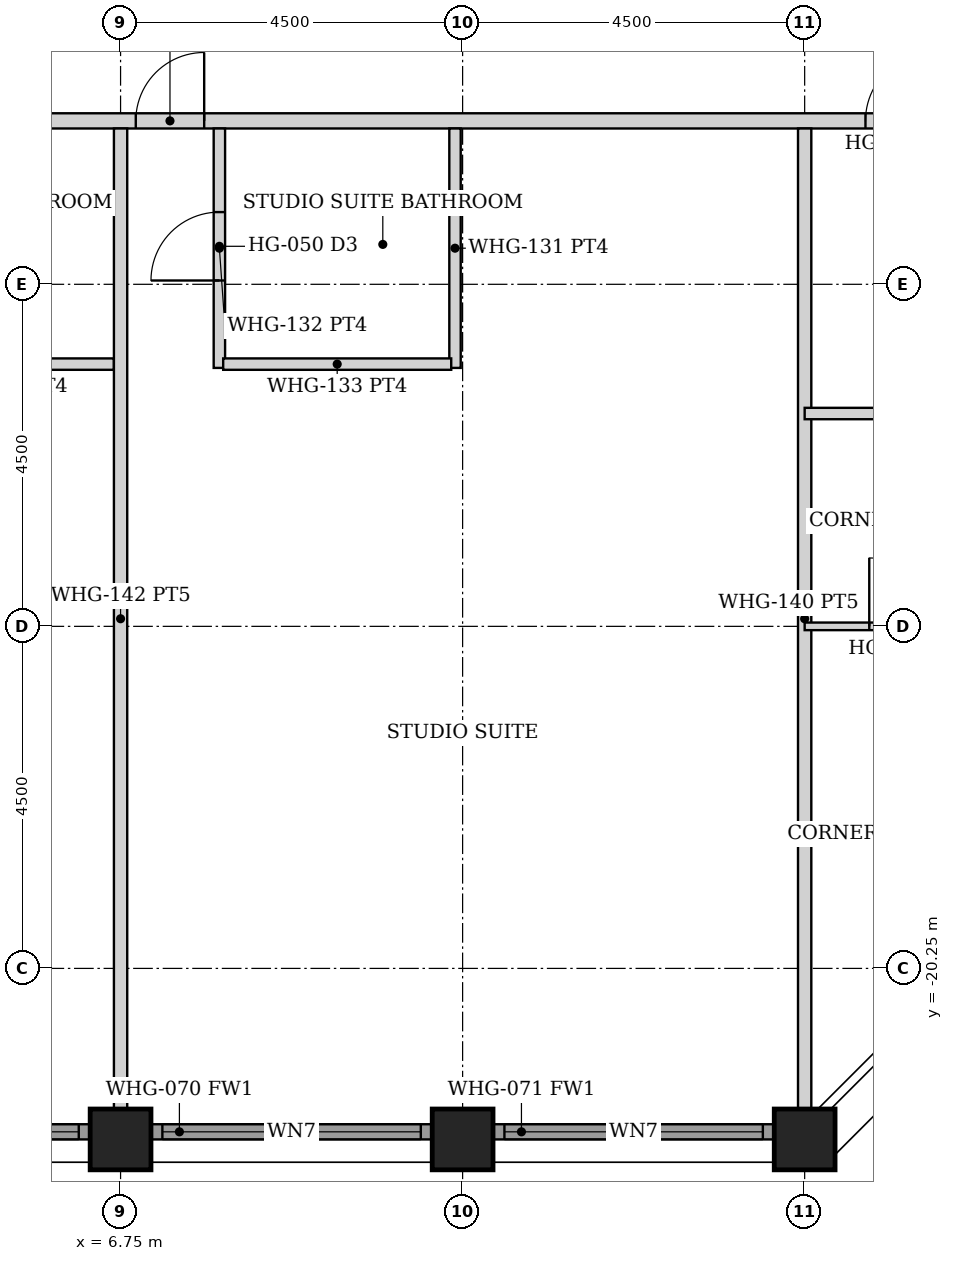
"""IFC4 building model, lengths in metres.
Left out: names, types, materials, properties, quantities, classifications, styles, units other than length and angle.
Written with IfcOpenShell. Run it as: python <this file> out.ifc"""

import sys

from ifc_helpers import new_model, si_unit, direction, frame, frame_2d, origin, origin_2d, place, context, subcontext, project, spatial, rectangle, hollow_rectangle, extrude, element, fill, save


model = new_model("IFC4")
c1 = context("Model", 3, precision=1e-05, world=origin(), true_north=direction((0.0, 1.0)))
c2 = subcontext(c1, "Body", "Model", "MODEL_VIEW")
j1 = project(units=[si_unit("LENGTHUNIT", "METRE"), si_unit("PLANEANGLEUNIT", "RADIAN")], contexts=[c1])
p1 = place(None, origin())
s1 = spatial("IfcSite", under=j1, at=p1, CompositionType="ELEMENT")
p2 = place(p1, origin())
s2 = spatial("IfcBuilding", under=s1, at=p2, CompositionType="ELEMENT")
p3 = place(p2, frame((0.0, 0.0, 186.8)))
s3 = spatial("IfcBuildingStorey", under=s2, at=p3, CompositionType="ELEMENT", Elevation=186.8)
for number, where, z_axis, x_axis in (
    (1, (6.75, -22.5, 0.0), (0.0, 0.0, 1.0), (0.0, 1.0, 0.0)),
    (2, (11.25, -22.5, 0.0), (0.0, 0.0, 1.0), (0.0, 1.0, 0.0)),
    (3, (15.75, -22.5, 0.0), (0.0, 0.0, 1.0), (0.0, 1.0, 0.0)),
):
    element("IfcColumn", number, at=place(p3, frame(where, z_axis=z_axis, x_axis=x_axis)), inside=s3, PredefinedType="COLUMN", context=c2, shape_type="SweptSolid", body=[
        extrude(hollow_rectangle(XDim=0.8, YDim=0.8, WallThickness=0.045, at=origin_2d()), origin(), (0.0, 0.0, 1.0), 3.6),
    ])
p4 = place(p3, frame((2.655, -22.4, 0.0), z_axis=(0.0, 0.0, 1.0), x_axis=(1.0, 0.0, 0.0)))
e4 = element("IfcWall", 4, at=p4, inside=s3, PredefinedType="SOLIDWALL", context=c2, shape_type="SweptSolid", body=[
    extrude(rectangle(XDim=3.69, YDim=0.2, at=frame_2d((1.845, 0.0))), origin(), (0.0, 0.0, 1.0), 2.379),
])
p5 = place(p4, frame((0.145, 0.0, 0.3)))
e5 = element("IfcOpeningElement", 5, at=p5, cuts=e4, PredefinedType="OPENING", context=c2, shape_type="SweptSolid", body=[
    extrude(rectangle(XDim=3.4, YDim=1.929, at=frame_2d((1.7, 0.964))), frame((0.0, 0.11, 0.0), z_axis=(0.0, -1.0, 0.0), x_axis=(1.0, 0.0, 0.0)), (0.0, 0.0, 1.0), 0.22),
])
p6 = place(p3, frame((7.155, -22.4, 0.0), z_axis=(0.0, 0.0, 1.0), x_axis=(1.0, 0.0, 0.0)))
e6 = element("IfcWall", 6, at=p6, inside=s3, PredefinedType="SOLIDWALL", context=c2, shape_type="SweptSolid", body=[
    extrude(rectangle(XDim=3.69, YDim=0.2, at=frame_2d((1.845, 0.0))), origin(), (0.0, 0.0, 1.0), 2.379),
])
p7 = place(p6, frame((0.145, 0.0, 0.3)))
e7 = element("IfcOpeningElement", 7, at=p7, cuts=e6, PredefinedType="OPENING", context=c2, shape_type="SweptSolid", body=[
    extrude(rectangle(XDim=3.4, YDim=1.929, at=frame_2d((1.7, 0.964))), frame((0.0, 0.11, 0.0), z_axis=(0.0, -1.0, 0.0), x_axis=(1.0, 0.0, 0.0)), (0.0, 0.0, 1.0), 0.22),
])
p8 = place(p3, frame((11.655, -22.4, 0.0), z_axis=(0.0, 0.0, 1.0), x_axis=(1.0, 0.0, 0.0)))
e8 = element("IfcWall", 8, at=p8, inside=s3, PredefinedType="SOLIDWALL", context=c2, shape_type="SweptSolid", body=[
    extrude(rectangle(XDim=3.69, YDim=0.2, at=frame_2d((1.845, 0.0))), origin(), (0.0, 0.0, 1.0), 2.379),
])
p9 = place(p8, frame((0.145, 0.0, 0.3)))
e9 = element("IfcOpeningElement", 9, at=p9, cuts=e8, PredefinedType="OPENING", context=c2, shape_type="SweptSolid", body=[
    extrude(rectangle(XDim=3.4, YDim=1.929, at=frame_2d((1.7, 0.964))), frame((0.0, 0.11, 0.0), z_axis=(0.0, -1.0, 0.0), x_axis=(1.0, 0.0, 0.0)), (0.0, 0.0, 1.0), 0.22),
])
p10 = place(p3, frame((-22.3, -9.1, 0.0), z_axis=(0.0, 0.0, 1.0), x_axis=(1.0, 0.0, 0.0)))
e10 = element("IfcWall", 10, at=p10, inside=s3, PredefinedType="PARTITIONING", context=c2, shape_type="SweptSolid", body=[
    extrude(rectangle(XDim=44.6, YDim=0.2, at=frame_2d((22.3, 0.0))), origin(), (0.0, 0.0, 1.0), 2.379),
])
p11 = place(p10, frame((11.35, 0.0, 0.0)))
e11 = element("IfcOpeningElement", 11, at=p11, cuts=e10, PredefinedType="OPENING", context=c2, shape_type="SweptSolid", body=[
    extrude(rectangle(XDim=0.9, YDim=2.1, at=frame_2d((0.45, 1.05))), frame((0.0, 0.11, 0.0), z_axis=(0.0, -1.0, 0.0), x_axis=(1.0, 0.0, 0.0)), (0.0, 0.0, 1.0), 0.22),
])
p12 = place(p10, frame((15.75, 0.0, 0.0)))
e12 = element("IfcOpeningElement", 12, at=p12, cuts=e10, PredefinedType="OPENING", context=c2, shape_type="SweptSolid", body=[
    extrude(rectangle(XDim=0.9, YDim=2.1, at=frame_2d((0.45, 1.05))), frame((0.0, 0.11, 0.0), z_axis=(0.0, -1.0, 0.0), x_axis=(1.0, 0.0, 0.0)), (0.0, 0.0, 1.0), 0.22),
])
p13 = place(p10, frame((23.45, 0.0, 0.0)))
e13 = element("IfcOpeningElement", 13, at=p13, cuts=e10, PredefinedType="OPENING", context=c2, shape_type="SweptSolid", body=[
    extrude(rectangle(XDim=0.9, YDim=2.1, at=frame_2d((0.45, 1.05))), frame((0.0, 0.11, 0.0), z_axis=(0.0, -1.0, 0.0), x_axis=(1.0, 0.0, 0.0)), (0.0, 0.0, 1.0), 0.22),
])
p14 = place(p10, frame((24.75, 0.0, 0.0)))
e14 = element("IfcOpeningElement", 14, at=p14, cuts=e10, PredefinedType="OPENING", context=c2, shape_type="SweptSolid", body=[
    extrude(rectangle(XDim=0.9, YDim=2.1, at=frame_2d((0.45, 1.05))), frame((0.0, 0.11, 0.0), z_axis=(0.0, -1.0, 0.0), x_axis=(1.0, 0.0, 0.0)), (0.0, 0.0, 1.0), 0.22),
])
p15 = place(p10, frame((29.25, 0.0, 0.0)))
e15 = element("IfcOpeningElement", 15, at=p15, cuts=e10, PredefinedType="OPENING", context=c2, shape_type="SweptSolid", body=[
    extrude(rectangle(XDim=0.9, YDim=2.1, at=frame_2d((0.45, 1.05))), frame((0.0, 0.11, 0.0), z_axis=(0.0, -1.0, 0.0), x_axis=(1.0, 0.0, 0.0)), (0.0, 0.0, 1.0), 0.22),
])
p16 = place(p10, frame((38.85, 0.0, 0.0)))
e16 = element("IfcOpeningElement", 16, at=p16, cuts=e10, PredefinedType="OPENING", context=c2, shape_type="SweptSolid", body=[
    extrude(rectangle(XDim=0.9, YDim=2.1, at=frame_2d((0.45, 1.05))), frame((0.0, 0.11, 0.0), z_axis=(0.0, -1.0, 0.0), x_axis=(1.0, 0.0, 0.0)), (0.0, 0.0, 1.0), 0.22),
])
p17 = place(p10, frame((4.85, 0.0, 0.0)))
e17 = element("IfcOpeningElement", 17, at=p17, cuts=e10, PredefinedType="OPENING", context=c2, shape_type="SweptSolid", body=[
    extrude(rectangle(XDim=0.9, YDim=2.1, at=frame_2d((0.45, 1.05))), frame((0.0, 0.11, 0.0), z_axis=(0.0, -1.0, 0.0), x_axis=(1.0, 0.0, 0.0)), (0.0, 0.0, 1.0), 0.22),
])
p18 = place(p3, frame((3.6, -12.3, 0.0), z_axis=(0.0, 0.0, 1.0), x_axis=(1.0, 0.0, 0.0)))
e18 = element("IfcWall", 18, at=p18, inside=s3, PredefinedType="PARTITIONING", context=c2, shape_type="SweptSolid", body=[
    extrude(rectangle(XDim=3.062, YDim=0.15, at=frame_2d((1.531, 0.0))), origin(), (0.0, 0.0, 1.0), 2.379),
])
p19 = place(p3, frame((8.05, -12.35, 0.0), z_axis=(0.0, 0.0, 1.0), x_axis=(0.0, 1.0, 0.0)))
e19 = element("IfcWall", 19, at=p19, inside=s3, PredefinedType="PARTITIONING", context=c2, shape_type="SweptSolid", body=[
    extrude(rectangle(XDim=3.15, YDim=0.15, at=frame_2d((1.575, 0.0))), origin(), (0.0, 0.0, 1.0), 2.379),
])
p20 = place(p19, frame((1.15, 0.0, 0.0)))
e20 = element("IfcOpeningElement", 20, at=p20, cuts=e19, PredefinedType="OPENING", context=c2, shape_type="SweptSolid", body=[
    extrude(rectangle(XDim=0.9, YDim=2.1, at=frame_2d((0.45, 1.05))), frame((0.0, 0.085, 0.0), z_axis=(0.0, -1.0, 0.0), x_axis=(1.0, 0.0, 0.0)), (0.0, 0.0, 1.0), 0.17),
])
p21 = place(p3, frame((11.15, -12.35, 0.0), z_axis=(0.0, 0.0, 1.0), x_axis=(0.0, 1.0, 0.0)))
e21 = element("IfcWall", 21, at=p21, inside=s3, PredefinedType="PARTITIONING", context=c2, shape_type="SweptSolid", body=[
    extrude(rectangle(XDim=3.15, YDim=0.15, at=frame_2d((1.575, 0.0))), origin(), (0.0, 0.0, 1.0), 2.379),
])
p22 = place(p3, frame((8.1, -12.3, 0.0), z_axis=(0.0, 0.0, 1.0), x_axis=(1.0, 0.0, 0.0)))
e22 = element("IfcWall", 22, at=p22, inside=s3, PredefinedType="PARTITIONING", context=c2, shape_type="SweptSolid", body=[
    extrude(rectangle(XDim=3.0, YDim=0.15, at=frame_2d((1.5, 0.0))), origin(), (0.0, 0.0, 1.0), 2.379),
])
for number, where, z_axis, x_axis in (
    (23, (6.75, -22.1, 0.0), (0.0, 0.0, 1.0), (0.0, 1.0, 0.0)),
    (24, (15.75, -22.1, 0.0), (0.0, 0.0, 1.0), (0.0, 1.0, 0.0)),
):
    element("IfcWall", number, at=place(p3, frame(where, z_axis=z_axis, x_axis=x_axis)), inside=s3, PredefinedType="PARTITIONING", context=c2, shape_type="SweptSolid", body=[
        extrude(rectangle(XDim=12.9, YDim=0.175, at=frame_2d((6.45, 0.0))), origin(), (0.0, 0.0, 1.0), 2.379),
    ])
p23 = place(p3, frame((15.75, -15.75, 0.0), z_axis=(0.0, 0.0, 1.0), x_axis=(1.0, 0.0, 0.0)))
e25 = element("IfcWall", 25, at=p23, inside=s3, PredefinedType="PARTITIONING", context=c2, shape_type="SweptSolid", body=[
    extrude(rectangle(XDim=6.35, YDim=0.1, at=frame_2d((3.175, 0.0))), origin(), (0.0, 0.0, 1.0), 2.379),
])
p24 = place(p23, frame((4.125, 0.0, 0.0)))
e26 = element("IfcOpeningElement", 26, at=p24, cuts=e25, PredefinedType="OPENING", context=c2, shape_type="SweptSolid", body=[
    extrude(rectangle(XDim=0.85, YDim=2.1, at=frame_2d((0.425, 1.05))), frame((0.0, 0.06, 0.0), z_axis=(0.0, -1.0, 0.0), x_axis=(1.0, 0.0, 0.0)), (0.0, 0.0, 1.0), 0.12),
])
p25 = place(p23, frame((0.85, 0.0, 0.0)))
e27 = element("IfcOpeningElement", 27, at=p25, cuts=e25, PredefinedType="OPENING", context=c2, shape_type="SweptSolid", body=[
    extrude(rectangle(XDim=0.9, YDim=2.1, at=frame_2d((0.45, 1.05))), frame((0.0, 0.06, 0.0), z_axis=(0.0, -1.0, 0.0), x_axis=(1.0, 0.0, 0.0)), (0.0, 0.0, 1.0), 0.12),
])
p26 = place(p3, frame((15.75, -12.95, 0.0), z_axis=(0.0, 0.0, 1.0), x_axis=(1.0, 0.0, 0.0)))
e28 = element("IfcWall", 28, at=p26, inside=s3, PredefinedType="PARTITIONING", context=c2, shape_type="SweptSolid", body=[
    extrude(rectangle(XDim=2.8, YDim=0.15, at=frame_2d((1.4, 0.0))), origin(), (0.0, 0.0, 1.0), 2.379),
])
p27 = place(p5, origin())
e29 = element("IfcWindow", 29, at=p27, inside=s3, PartitioningType="SINGLE_PANEL", PredefinedType="WINDOW", context=c2, shape_type="SweptSolid", body=[
    extrude(rectangle(XDim=3.4, YDim=1.929, at=frame_2d((1.7, 0.964))), frame((0.0, 0.03, 0.0), z_axis=(0.0, -1.0, 0.0), x_axis=(1.0, 0.0, 0.0)), (0.0, 0.0, 1.0), 0.06),
])
fill(e5, e29)
p28 = place(p7, origin())
e30 = element("IfcWindow", 30, at=p28, inside=s3, PartitioningType="SINGLE_PANEL", PredefinedType="WINDOW", context=c2, shape_type="SweptSolid", body=[
    extrude(rectangle(XDim=3.4, YDim=1.929, at=frame_2d((1.7, 0.964))), frame((0.0, 0.03, 0.0), z_axis=(0.0, -1.0, 0.0), x_axis=(1.0, 0.0, 0.0)), (0.0, 0.0, 1.0), 0.06),
])
fill(e7, e30)
p29 = place(p9, origin())
e31 = element("IfcWindow", 31, at=p29, inside=s3, PartitioningType="SINGLE_PANEL", PredefinedType="WINDOW", context=c2, shape_type="SweptSolid", body=[
    extrude(rectangle(XDim=3.4, YDim=1.929, at=frame_2d((1.7, 0.964))), frame((0.0, 0.03, 0.0), z_axis=(0.0, -1.0, 0.0), x_axis=(1.0, 0.0, 0.0)), (0.0, 0.0, 1.0), 0.06),
])
fill(e9, e31)
p30 = place(p15, origin())
e32 = element("IfcDoor", 32, at=p30, inside=s3, OperationType="SINGLE_SWING_RIGHT", PredefinedType="DOOR", context=c2, shape_type="SweptSolid", body=[
    extrude(rectangle(XDim=0.9, YDim=2.1, at=frame_2d((0.45, 1.05))), frame((0.0, 0.025, 0.0), z_axis=(0.0, -1.0, 0.0), x_axis=(1.0, 0.0, 0.0)), (0.0, 0.0, 1.0), 0.05),
])
fill(e15, e32)
p31 = place(p20, origin())
e33 = element("IfcDoor", 33, at=p31, inside=s3, OperationType="SINGLE_SWING_LEFT", PredefinedType="DOOR", context=c2, shape_type="SweptSolid", body=[
    extrude(rectangle(XDim=0.9, YDim=2.1, at=frame_2d((0.45, 1.05))), frame((0.0, 0.025, 0.0), z_axis=(0.0, -1.0, 0.0), x_axis=(1.0, 0.0, 0.0)), (0.0, 0.0, 1.0), 0.05),
])
fill(e20, e33)
p32 = place(p16, origin())
e34 = element("IfcDoor", 34, at=p32, inside=s3, OperationType="SINGLE_SWING_RIGHT", PredefinedType="DOOR", context=c2, shape_type="SweptSolid", body=[
    extrude(rectangle(XDim=0.9, YDim=2.1, at=frame_2d((0.45, 1.05))), frame((0.0, 0.025, 0.0), z_axis=(0.0, -1.0, 0.0), x_axis=(1.0, 0.0, 0.0)), (0.0, 0.0, 1.0), 0.05),
])
fill(e16, e34)
p33 = place(p25, origin())
e35 = element("IfcDoor", 35, at=p33, inside=s3, OperationType="SINGLE_SWING_LEFT", PredefinedType="DOOR", context=c2, shape_type="SweptSolid", body=[
    extrude(rectangle(XDim=0.9, YDim=2.1, at=frame_2d((0.45, 1.05))), frame((0.0, 0.025, 0.0), z_axis=(0.0, -1.0, 0.0), x_axis=(1.0, 0.0, 0.0)), (0.0, 0.0, 1.0), 0.05),
])
fill(e27, e35)
save(model, sys.argv[1])
